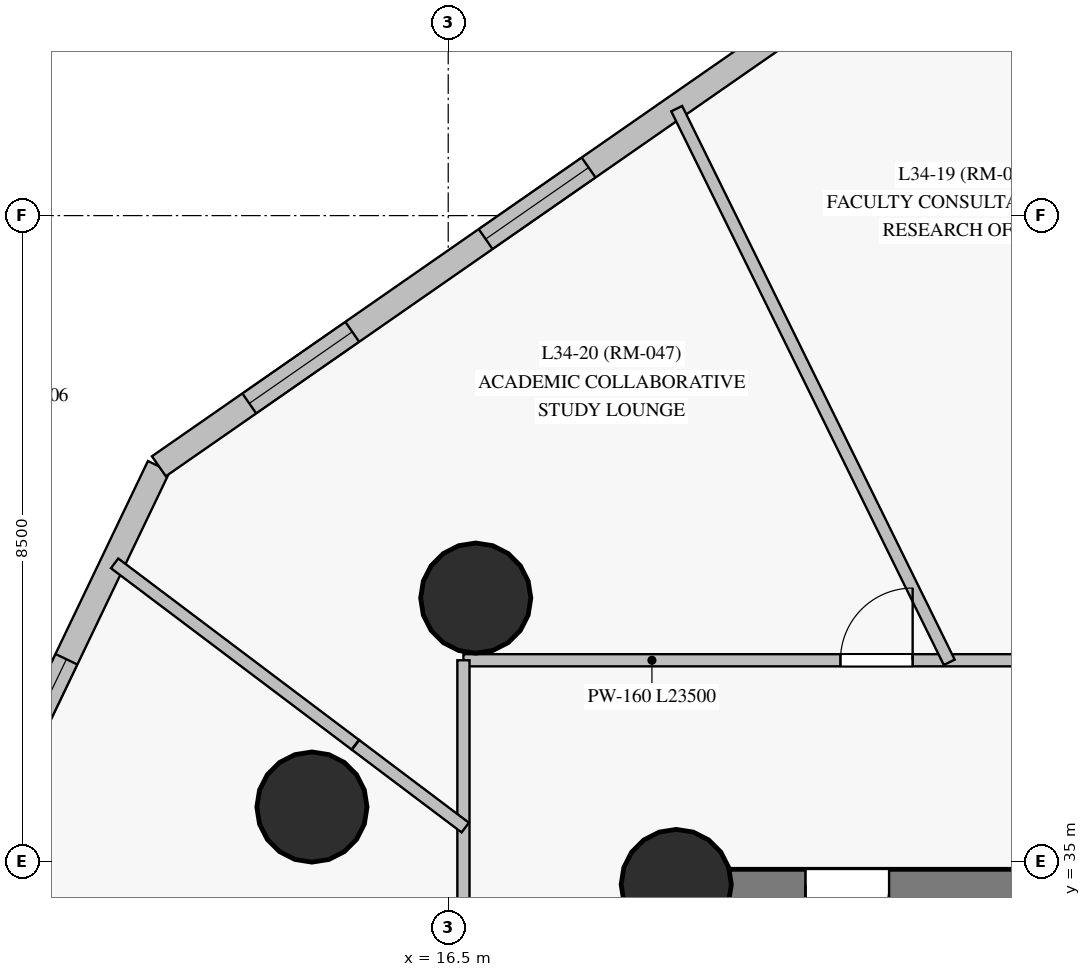
"""IFC4 building model, lengths in metres.
Left out: names, types, materials, properties, quantities, classifications, styles, units other than length and angle.
Written with IfcOpenShell. Run it as: python <this file> out.ifc"""

import sys

from ifc_helpers import new_model, si_unit, direction, frame, frame_2d, origin, origin_with_axes, origin_2d, place, context, subcontext, project, spatial, rectangle, circle, extrude, source, transform, mapped, element, fill, save


model = new_model("IFC4")
c1 = context("Model", 3, precision=1e-05, world=origin(), true_north=direction((0.0, 1.0)))
c2 = subcontext(c1, "Body", "Model", "MODEL_VIEW")
j1 = project(units=[si_unit("LENGTHUNIT", "METRE"), si_unit("PLANEANGLEUNIT", "RADIAN")], contexts=[c1])
p1 = place(None, origin())
s1 = spatial("IfcSite", under=j1, at=p1, CompositionType="ELEMENT")
p2 = place(p1, origin())
s2 = spatial("IfcBuilding", under=s1, at=p2, CompositionType="ELEMENT")
p3 = place(p2, frame((0.0, 0.0, 123.65)))
s3 = spatial("IfcBuildingStorey", under=s2, at=p3, CompositionType="ELEMENT", Elevation=123.65)
p4 = place(p3, frame((26.55, 34.7, 0.0), z_axis=(0.0, 0.0, 1.0), x_axis=(-1.0, 0.0, 0.0)))
e1 = element("IfcWall", 1, at=p4, inside=s3, PredefinedType="SHEAR", context=c2, shape_type="SweptSolid", body=[
    extrude(rectangle(XDim=7.05, YDim=0.4, at=frame_2d((3.525, 0.0))), origin(), (0.0, 0.0, 1.0), 2.825),
])
p5 = place(p4, frame((4.25, 0.0, 0.0)))
e2 = element("IfcOpeningElement", 2, at=p5, cuts=e1, PredefinedType="OPENING", context=c2, shape_type="SweptSolid", body=[
    extrude(rectangle(XDim=1.1, YDim=2.15, at=frame_2d((0.55, 1.075))), frame((0.0, 0.21, 0.0), z_axis=(0.0, -1.0, 0.0), x_axis=(1.0, 0.0, 0.0)), (0.0, 0.0, 1.0), 0.42),
])
p6 = place(p3, frame((19.5, 34.7, 0.0), z_axis=(0.0, 0.0, 1.0), x_axis=(0.0, -1.0, 0.0)))
e3 = element("IfcWall", 3, at=p6, inside=s3, PredefinedType="SHEAR", context=c2, shape_type="SweptSolid", body=[
    extrude(rectangle(XDim=16.4, YDim=0.4, at=frame_2d((8.2, 0.0))), origin(), (0.0, 0.0, 1.0), 2.825),
])
p7 = place(p6, frame((3.1, 0.0, 0.0)))
e4 = element("IfcOpeningElement", 4, at=p7, cuts=e3, PredefinedType="OPENING", context=c2, shape_type="SweptSolid", body=[
    extrude(rectangle(XDim=1.1, YDim=2.15, at=frame_2d((0.55, 1.075))), frame((0.0, 0.21, 0.0), z_axis=(0.0, -1.0, 0.0), x_axis=(1.0, 0.0, 0.0)), (0.0, 0.0, 1.0), 0.42),
])
m1 = source(origin_with_axes(), c2, "Body", "SweptSolid", [
    extrude(circle(Radius=0.725, at=origin_2d()), origin(), (0.0, 0.0, 1.0), 3.05),
])
for number, where, z_axis, x_axis in (
    (5, (19.5, 34.7, 0.0), (0.0, 0.0, 1.0), (1.0, 0.0, 0.0)),
    (6, (16.862, 38.468, 0.0), (0.0, 0.0, 1.0), (1.0, 0.0, 0.0)),
    (7, (14.707, 35.719, 0.0), (0.0, 0.0, 1.0), (1.0, 0.0, 0.0)),
):
    element("IfcColumn", number, at=place(p3, frame(where, z_axis=z_axis, x_axis=x_axis)), inside=s3, PredefinedType="COLUMN", context=c2, shape_type="MappedRepresentation", body=[
        mapped(m1, transform((0.0, 0.0, 0.0), scale=1.0)),
    ])
p8 = place(p3, frame((12.694, 40.202, 0.0), z_axis=(0.0, 0.0, 1.0), x_axis=(-0.432097729805, -0.901826785972, 0.0)))
e8 = element("IfcWall", 8, at=p8, inside=s3, PredefinedType="SOLIDWALL", context=c2, shape_type="SweptSolid", body=[
    extrude(rectangle(XDim=11.055, YDim=0.32, at=frame_2d((5.527, 0.0))), origin(), (0.0, 0.0, 1.0), 2.825),
])
p9 = place(p8, frame((2.815, 0.0, 0.85)))
e9 = element("IfcOpeningElement", 9, at=p9, cuts=e8, PredefinedType="OPENING", context=c2, shape_type="SweptSolid", body=[
    extrude(rectangle(XDim=1.65, YDim=1.65, at=frame_2d((0.825, 0.825))), frame((0.0, 0.17, 0.0), z_axis=(0.0, -1.0, 0.0), x_axis=(1.0, 0.0, 0.0)), (0.0, 0.0, 1.0), 0.34),
])
p10 = place(p8, frame((6.635, 0.0, 0.85)))
e10 = element("IfcOpeningElement", 10, at=p10, cuts=e8, PredefinedType="OPENING", context=c2, shape_type="SweptSolid", body=[
    extrude(rectangle(XDim=1.65, YDim=1.65, at=frame_2d((0.825, 0.825))), frame((0.0, 0.17, 0.0), z_axis=(0.0, -1.0, 0.0), x_axis=(1.0, 0.0, 0.0)), (0.0, 0.0, 1.0), 0.34),
])
p11 = place(p3, frame((24.021, 48.077, 0.0), z_axis=(0.0, 0.0, 1.0), x_axis=(-0.821066763307, -0.570832173404, 0.0)))
e11 = element("IfcWall", 11, at=p11, inside=s3, PredefinedType="SOLIDWALL", context=c2, shape_type="SweptSolid", body=[
    extrude(rectangle(XDim=13.796, YDim=0.32, at=frame_2d((6.898, 0.0))), origin(), (0.0, 0.0, 1.0), 2.825),
])
p12 = place(p11, frame((1.966, 0.0, 0.85)))
e12 = element("IfcOpeningElement", 12, at=p12, cuts=e11, PredefinedType="OPENING", context=c2, shape_type="SweptSolid", body=[
    extrude(rectangle(XDim=1.65, YDim=1.65, at=frame_2d((0.825, 0.825))), frame((0.0, 0.17, 0.0), z_axis=(0.0, -1.0, 0.0), x_axis=(1.0, 0.0, 0.0)), (0.0, 0.0, 1.0), 0.34),
])
p13 = place(p11, frame((6.91, 0.0, 0.85)))
e13 = element("IfcOpeningElement", 13, at=p13, cuts=e11, PredefinedType="OPENING", context=c2, shape_type="SweptSolid", body=[
    extrude(rectangle(XDim=1.65, YDim=1.65, at=frame_2d((0.825, 0.825))), frame((0.0, 0.17, 0.0), z_axis=(0.0, -1.0, 0.0), x_axis=(1.0, 0.0, 0.0)), (0.0, 0.0, 1.0), 0.34),
])
p14 = place(p11, frame((10.697, 0.0, 0.85)))
e14 = element("IfcOpeningElement", 14, at=p14, cuts=e11, PredefinedType="OPENING", context=c2, shape_type="SweptSolid", body=[
    extrude(rectangle(XDim=1.65, YDim=1.65, at=frame_2d((0.825, 0.825))), frame((0.0, 0.17, 0.0), z_axis=(0.0, -1.0, 0.0), x_axis=(1.0, 0.0, 0.0)), (0.0, 0.0, 1.0), 0.34),
])
p15 = place(p3, frame((16.7, 37.65, 0.0), z_axis=(0.0, 0.0, 1.0), x_axis=(1.0, 0.0, 0.0)))
e15 = element("IfcWall", 15, at=p15, inside=s3, PredefinedType="PARTITIONING", context=c2, shape_type="SweptSolid", body=[
    extrude(rectangle(XDim=23.5, YDim=0.16, at=frame_2d((11.75, 0.0))), origin(), (0.0, 0.0, 1.0), 2.325),
])
p16 = place(p15, frame((20.866, 0.0, 0.0)))
e16 = element("IfcOpeningElement", 16, at=p16, cuts=e15, PredefinedType="OPENING", context=c2, shape_type="SweptSolid", body=[
    extrude(rectangle(XDim=0.95, YDim=2.15, at=frame_2d((0.475, 1.075))), frame((0.0, 0.09, 0.0), z_axis=(0.0, -1.0, 0.0), x_axis=(1.0, 0.0, 0.0)), (0.0, 0.0, 1.0), 0.18),
])
p17 = place(p15, frame((17.15, 0.0, 0.0)))
e17 = element("IfcOpeningElement", 17, at=p17, cuts=e15, PredefinedType="OPENING", context=c2, shape_type="SweptSolid", body=[
    extrude(rectangle(XDim=0.95, YDim=2.15, at=frame_2d((0.475, 1.075))), frame((0.0, 0.09, 0.0), z_axis=(0.0, -1.0, 0.0), x_axis=(1.0, 0.0, 0.0)), (0.0, 0.0, 1.0), 0.18),
])
p18 = place(p15, frame((14.76, 0.0, 0.0)))
e18 = element("IfcOpeningElement", 18, at=p18, cuts=e15, PredefinedType="OPENING", context=c2, shape_type="SweptSolid", body=[
    extrude(rectangle(XDim=0.96, YDim=2.15, at=frame_2d((0.48, 1.075))), frame((0.0, 0.09, 0.0), z_axis=(0.0, -1.0, 0.0), x_axis=(1.0, 0.0, 0.0)), (0.0, 0.0, 1.0), 0.18),
])
p19 = place(p15, frame((11.275, 0.0, 0.0)))
e19 = element("IfcOpeningElement", 19, at=p19, cuts=e15, PredefinedType="OPENING", context=c2, shape_type="SweptSolid", body=[
    extrude(rectangle(XDim=0.95, YDim=2.15, at=frame_2d((0.475, 1.075))), frame((0.0, 0.09, 0.0), z_axis=(0.0, -1.0, 0.0), x_axis=(1.0, 0.0, 0.0)), (0.0, 0.0, 1.0), 0.18),
])
p20 = place(p15, frame((7.75, 0.0, 0.0)))
e20 = element("IfcOpeningElement", 20, at=p20, cuts=e15, PredefinedType="OPENING", context=c2, shape_type="SweptSolid", body=[
    extrude(rectangle(XDim=0.95, YDim=2.15, at=frame_2d((0.475, 1.075))), frame((0.0, 0.09, 0.0), z_axis=(0.0, -1.0, 0.0), x_axis=(1.0, 0.0, 0.0)), (0.0, 0.0, 1.0), 0.18),
])
p21 = place(p15, frame((4.96, 0.0, 0.0)))
e21 = element("IfcOpeningElement", 21, at=p21, cuts=e15, PredefinedType="OPENING", context=c2, shape_type="SweptSolid", body=[
    extrude(rectangle(XDim=0.95, YDim=2.15, at=frame_2d((0.475, 1.075))), frame((0.0, 0.09, 0.0), z_axis=(0.0, -1.0, 0.0), x_axis=(1.0, 0.0, 0.0)), (0.0, 0.0, 1.0), 0.18),
])
p22 = place(p3, frame((16.7, 15.35, 0.0), z_axis=(0.0, 0.0, 1.0), x_axis=(0.0, 1.0, 0.0)))
e22 = element("IfcWall", 22, at=p22, inside=s3, PredefinedType="PARTITIONING", context=c2, shape_type="SweptSolid", body=[
    extrude(rectangle(XDim=22.3, YDim=0.16, at=frame_2d((11.15, 0.0))), origin(), (0.0, 0.0, 1.0), 2.225),
])
p23 = place(p22, frame((10.235, 0.0, 0.0)))
e23 = element("IfcOpeningElement", 23, at=p23, cuts=e22, PredefinedType="OPENING", context=c2, shape_type="SweptSolid", body=[
    extrude(rectangle(XDim=0.95, YDim=2.15, at=frame_2d((0.475, 1.075))), frame((0.0, 0.09, 0.0), z_axis=(0.0, -1.0, 0.0), x_axis=(1.0, 0.0, 0.0)), (0.0, 0.0, 1.0), 0.18),
])
p24 = place(p22, frame((7.33, 0.0, 0.0)))
e24 = element("IfcOpeningElement", 24, at=p24, cuts=e22, PredefinedType="OPENING", context=c2, shape_type="SweptSolid", body=[
    extrude(rectangle(XDim=0.96, YDim=2.15, at=frame_2d((0.48, 1.075))), frame((0.0, 0.09, 0.0), z_axis=(0.0, -1.0, 0.0), x_axis=(1.0, 0.0, 0.0)), (0.0, 0.0, 1.0), 0.18),
])
p25 = place(p22, frame((2.613, 0.0, 0.0)))
e25 = element("IfcOpeningElement", 25, at=p25, cuts=e22, PredefinedType="OPENING", context=c2, shape_type="SweptSolid", body=[
    extrude(rectangle(XDim=0.95, YDim=2.15, at=frame_2d((0.475, 1.075))), frame((0.0, 0.09, 0.0), z_axis=(0.0, -1.0, 0.0), x_axis=(1.0, 0.0, 0.0)), (0.0, 0.0, 1.0), 0.18),
])
p26 = place(p22, frame((14.36, 0.0, 0.0)))
e26 = element("IfcOpeningElement", 26, at=p26, cuts=e22, PredefinedType="OPENING", context=c2, shape_type="SweptSolid", body=[
    extrude(rectangle(XDim=0.95, YDim=2.15, at=frame_2d((0.475, 1.075))), frame((0.0, 0.09, 0.0), z_axis=(0.0, -1.0, 0.0), x_axis=(1.0, 0.0, 0.0)), (0.0, 0.0, 1.0), 0.18),
])
p27 = place(p22, frame((12.296, 0.0, 0.0)))
e27 = element("IfcOpeningElement", 27, at=p27, cuts=e22, PredefinedType="OPENING", context=c2, shape_type="SweptSolid", body=[
    extrude(rectangle(XDim=0.95, YDim=2.15, at=frame_2d((0.475, 1.075))), frame((0.0, 0.09, 0.0), z_axis=(0.0, -1.0, 0.0), x_axis=(1.0, 0.0, 0.0)), (0.0, 0.0, 1.0), 0.18),
])
p28 = place(p3, frame((23.092, 37.623, 0.0), z_axis=(0.0, 0.0, 1.0), x_axis=(-0.441623698669, 0.897200372701, 0.0)))
e28 = element("IfcWall", 28, at=p28, inside=s3, PredefinedType="PARTITIONING", context=c2, shape_type="SweptSolid", body=[
    extrude(rectangle(XDim=8.119, YDim=0.16, at=frame_2d((4.06, 0.0))), origin(), (0.0, 0.0, 1.0), 2.825),
])
p29 = place(p3, frame((15.277, 36.539, 0.0), z_axis=(0.0, 0.0, 1.0), x_axis=(-0.798645855247, 0.601801294363, 0.0)))
e29 = element("IfcWall", 29, at=p29, inside=s3, PredefinedType="PARTITIONING", context=c2, shape_type="SweptSolid", body=[
    extrude(rectangle(XDim=3.965, YDim=0.16, at=frame_2d((1.982, 0.0))), origin(), (0.0, 0.0, 1.0), 2.825),
])
p30 = place(p3, frame((16.724, 35.449, 0.0), z_axis=(0.0, 0.0, 1.0), x_axis=(-0.798733223163, 0.601685331561, 0.0)))
e30 = element("IfcWall", 30, at=p30, inside=s3, PredefinedType="PARTITIONING", context=c2, shape_type="SweptSolid", body=[
    extrude(rectangle(XDim=1.806, YDim=0.16, at=frame_2d((0.903, 0.0))), origin(), (0.0, 0.0, 1.0), 2.225),
])
m2 = source(origin_with_axes(), c2, "Body", "SweptSolid", [
    extrude(rectangle(XDim=1.65, YDim=1.65, at=frame_2d((0.825, 0.825))), frame((0.0, 0.03, 0.0), z_axis=(0.0, -1.0, 0.0), x_axis=(1.0, 0.0, 0.0)), (0.0, 0.0, 1.0), 0.06),
])
p31 = place(p9, origin())
e31 = element("IfcWindow", 31, at=p31, inside=s3, PartitioningType="SINGLE_PANEL", PredefinedType="WINDOW", context=c2, shape_type="MappedRepresentation", body=[
    mapped(m2, transform((0.0, 0.0, 0.0), scale=1.0)),
])
fill(e9, e31)
p32 = place(p13, origin())
e32 = element("IfcWindow", 32, at=p32, inside=s3, PartitioningType="SINGLE_PANEL", PredefinedType="WINDOW", context=c2, shape_type="MappedRepresentation", body=[
    mapped(m2, transform((0.0, 0.0, 0.0), scale=1.0)),
])
fill(e13, e32)
p33 = place(p14, origin())
e33 = element("IfcWindow", 33, at=p33, inside=s3, PartitioningType="SINGLE_PANEL", PredefinedType="WINDOW", context=c2, shape_type="MappedRepresentation", body=[
    mapped(m2, transform((0.0, 0.0, 0.0), scale=1.0)),
])
fill(e14, e33)
m3 = source(origin_with_axes(), c2, "Body", "SweptSolid", [
    extrude(rectangle(XDim=1.1, YDim=2.15, at=frame_2d((0.55, 1.075))), frame((0.0, 0.025, 0.0), z_axis=(0.0, -1.0, 0.0), x_axis=(1.0, 0.0, 0.0)), (0.0, 0.0, 1.0), 0.05),
])
p34 = place(p5, origin())
e34 = element("IfcDoor", 34, at=p34, inside=s3, OperationType="SINGLE_SWING_RIGHT", PredefinedType="DOOR", context=c2, shape_type="MappedRepresentation", body=[
    mapped(m3, transform((0.0, 0.0, 0.0), scale=1.0)),
])
fill(e2, e34)
m4 = source(origin_with_axes(), c2, "Body", "SweptSolid", [
    extrude(rectangle(XDim=0.95, YDim=2.15, at=frame_2d((0.475, 1.075))), frame((0.0, 0.025, 0.0), z_axis=(0.0, -1.0, 0.0), x_axis=(1.0, 0.0, 0.0)), (0.0, 0.0, 1.0), 0.05),
])
p35 = place(p21, origin())
e35 = element("IfcDoor", 35, at=p35, inside=s3, OperationType="SINGLE_SWING_RIGHT", PredefinedType="DOOR", context=c2, shape_type="MappedRepresentation", body=[
    mapped(m4, transform((0.0, 0.0, 0.0), scale=1.0)),
])
fill(e21, e35)
save(model, sys.argv[1])
